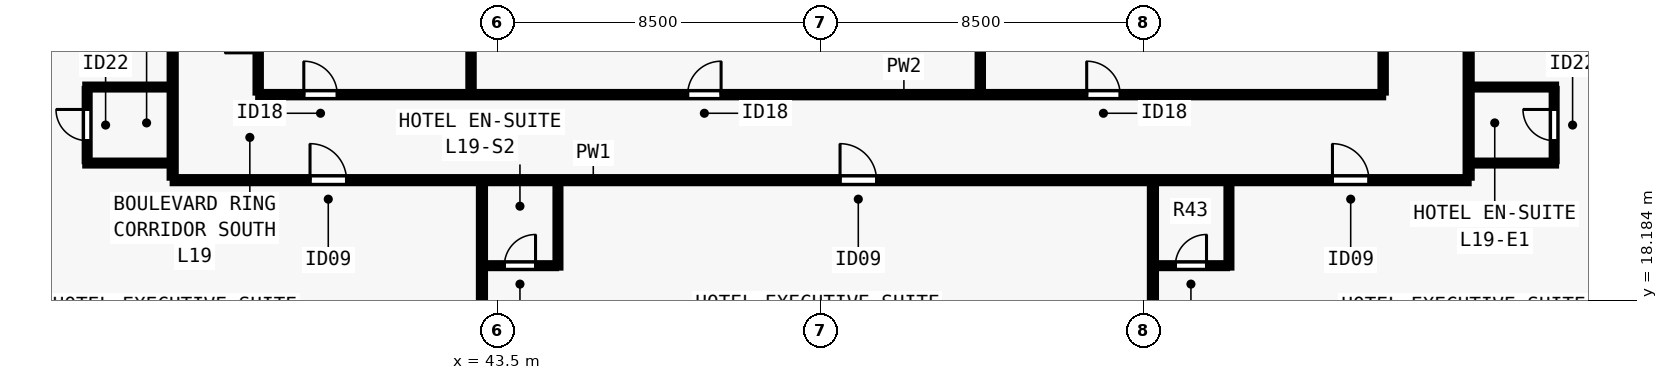
"""IFC4 building model, lengths in metres.
Left out: names, types, materials, properties, quantities, classifications, styles, units other than length and angle.
Written with IfcOpenShell. Run it as: python <this file> out.ifc"""

import sys

from ifc_helpers import new_model, si_unit, direction, frame, frame_2d, origin, place, context, subcontext, project, spatial, rectangle, extrude, element, fill, save


model = new_model("IFC4")
c1 = context("Model", 3, precision=1e-05, world=origin(), true_north=direction((0.0, 1.0)))
c2 = subcontext(c1, "Body", "Model", "MODEL_VIEW")
j1 = project(units=[si_unit("LENGTHUNIT", "METRE"), si_unit("PLANEANGLEUNIT", "RADIAN")], contexts=[c1])
p1 = place(None, origin())
s1 = spatial("IfcSite", under=j1, at=p1, CompositionType="ELEMENT")
p2 = place(p1, origin())
s2 = spatial("IfcBuilding", under=s1, at=p2, CompositionType="ELEMENT")
p3 = place(p2, frame((0.0, 0.0, 72.5)))
s3 = spatial("IfcBuildingStorey", under=s2, at=p3, CompositionType="ELEMENT", Elevation=72.5)
p4 = place(p3, frame((34.95, 21.35, 0.0), z_axis=(0.0, 0.0, 1.0), x_axis=(1.0, 0.0, 0.0)))
e1 = element("IfcWall", 1, at=p4, inside=s3, PredefinedType="PARTITIONING", context=c2, shape_type="SweptSolid", body=[
    extrude(rectangle(XDim=34.1, YDim=0.16, at=frame_2d((17.05, 0.0))), origin(), (0.0, 0.0, 1.0), 3.28),
])
p5 = place(p4, frame((3.614, 0.0, 0.0)))
e2 = element("IfcOpeningElement", 2, at=p5, cuts=e1, PredefinedType="OPENING", context=c2, shape_type="SweptSolid", body=[
    extrude(rectangle(XDim=0.96, YDim=2.15, at=frame_2d((0.48, 1.075))), frame((0.0, 0.09, 0.0), z_axis=(0.0, -1.0, 0.0), x_axis=(1.0, 0.0, 0.0)), (0.0, 0.0, 1.0), 0.18),
])
p6 = place(p4, frame((17.56, 0.0, 0.0)))
e3 = element("IfcOpeningElement", 3, at=p6, cuts=e1, PredefinedType="OPENING", context=c2, shape_type="SweptSolid", body=[
    extrude(rectangle(XDim=0.96, YDim=2.15, at=frame_2d((0.48, 1.075))), frame((0.0, 0.09, 0.0), z_axis=(0.0, -1.0, 0.0), x_axis=(1.0, 0.0, 0.0)), (0.0, 0.0, 1.0), 0.18),
])
p7 = place(p4, frame((30.516, 0.0, 0.0)))
e4 = element("IfcOpeningElement", 4, at=p7, cuts=e1, PredefinedType="OPENING", context=c2, shape_type="SweptSolid", body=[
    extrude(rectangle(XDim=0.96, YDim=2.15, at=frame_2d((0.48, 1.075))), frame((0.0, 0.09, 0.0), z_axis=(0.0, -1.0, 0.0), x_axis=(1.0, 0.0, 0.0)), (0.0, 0.0, 1.0), 0.18),
])
p8 = place(p3, frame((34.95, 21.415, 0.0), z_axis=(0.0, 0.0, 1.0), x_axis=(0.0, 1.0, 0.0)))
e5 = element("IfcWall", 5, at=p8, inside=s3, PredefinedType="PARTITIONING", context=c2, shape_type="SweptSolid", body=[
    extrude(rectangle(XDim=35.17, YDim=0.16, at=frame_2d((17.585, 0.0))), origin(), (0.0, 0.0, 1.0), 3.28),
])
p9 = place(p8, frame((9.414, 0.0, 0.0)))
e6 = element("IfcOpeningElement", 6, at=p9, cuts=e5, PredefinedType="OPENING", context=c2, shape_type="SweptSolid", body=[
    extrude(rectangle(XDim=0.96, YDim=2.15, at=frame_2d((0.48, 1.075))), frame((0.0, 0.09, 0.0), z_axis=(0.0, -1.0, 0.0), x_axis=(1.0, 0.0, 0.0)), (0.0, 0.0, 1.0), 0.18),
])
p10 = place(p8, frame((26.814, 0.0, 0.0)))
e7 = element("IfcOpeningElement", 7, at=p10, cuts=e5, PredefinedType="OPENING", context=c2, shape_type="SweptSolid", body=[
    extrude(rectangle(XDim=0.96, YDim=2.15, at=frame_2d((0.48, 1.075))), frame((0.0, 0.09, 0.0), z_axis=(0.0, -1.0, 0.0), x_axis=(1.0, 0.0, 0.0)), (0.0, 0.0, 1.0), 0.18),
])
p11 = place(p3, frame((69.05, 21.415, 0.0), z_axis=(0.0, 0.0, 1.0), x_axis=(0.0, 1.0, 0.0)))
e8 = element("IfcWall", 8, at=p11, inside=s3, PredefinedType="PARTITIONING", context=c2, shape_type="SweptSolid", body=[
    extrude(rectangle(XDim=35.17, YDim=0.16, at=frame_2d((17.585, 0.0))), origin(), (0.0, 0.0, 1.0), 3.28),
])
p12 = place(p11, frame((9.746, 0.0, 0.0)))
e9 = element("IfcOpeningElement", 9, at=p12, cuts=e8, PredefinedType="OPENING", context=c2, shape_type="SweptSolid", body=[
    extrude(rectangle(XDim=0.96, YDim=2.15, at=frame_2d((0.48, 1.075))), frame((0.0, 0.09, 0.0), z_axis=(0.0, -1.0, 0.0), x_axis=(1.0, 0.0, 0.0)), (0.0, 0.0, 1.0), 0.18),
])
p13 = place(p11, frame((27.146, 0.0, 0.0)))
e10 = element("IfcOpeningElement", 10, at=p13, cuts=e8, PredefinedType="OPENING", context=c2, shape_type="SweptSolid", body=[
    extrude(rectangle(XDim=0.96, YDim=2.15, at=frame_2d((0.48, 1.075))), frame((0.0, 0.09, 0.0), z_axis=(0.0, -1.0, 0.0), x_axis=(1.0, 0.0, 0.0)), (0.0, 0.0, 1.0), 0.18),
])
p14 = place(p3, frame((37.2, 23.6, 0.0), z_axis=(0.0, 0.0, 1.0), x_axis=(1.0, 0.0, 0.0)))
e11 = element("IfcWall", 11, at=p14, inside=s3, PredefinedType="PARTITIONING", context=c2, shape_type="SweptSolid", body=[
    extrude(rectangle(XDim=29.6, YDim=0.14, at=frame_2d((14.8, 0.0))), origin(), (0.0, 0.0, 1.0), 3.28),
])
p15 = place(p14, frame((1.2, 0.0, 0.0)))
e12 = element("IfcOpeningElement", 12, at=p15, cuts=e11, PredefinedType="OPENING", context=c2, shape_type="SweptSolid", body=[
    extrude(rectangle(XDim=0.88, YDim=2.1, at=frame_2d((0.44, 1.05))), frame((0.0, 0.08, 0.0), z_axis=(0.0, -1.0, 0.0), x_axis=(1.0, 0.0, 0.0)), (0.0, 0.0, 1.0), 0.16),
])
p16 = place(p14, frame((11.3, 0.0, 0.0)))
e13 = element("IfcOpeningElement", 13, at=p16, cuts=e11, PredefinedType="OPENING", context=c2, shape_type="SweptSolid", body=[
    extrude(rectangle(XDim=0.88, YDim=2.1, at=frame_2d((0.44, 1.05))), frame((0.0, 0.08, 0.0), z_axis=(0.0, -1.0, 0.0), x_axis=(1.0, 0.0, 0.0)), (0.0, 0.0, 1.0), 0.16),
])
p17 = place(p14, frame((21.8, 0.0, 0.0)))
e14 = element("IfcOpeningElement", 14, at=p17, cuts=e11, PredefinedType="OPENING", context=c2, shape_type="SweptSolid", body=[
    extrude(rectangle(XDim=0.88, YDim=2.1, at=frame_2d((0.44, 1.05))), frame((0.0, 0.08, 0.0), z_axis=(0.0, -1.0, 0.0), x_axis=(1.0, 0.0, 0.0)), (0.0, 0.0, 1.0), 0.16),
])
p18 = place(p3, frame((37.2, 23.655, 0.0), z_axis=(0.0, 0.0, 1.0), x_axis=(0.0, 1.0, 0.0)))
e15 = element("IfcWall", 15, at=p18, inside=s3, PredefinedType="PARTITIONING", context=c2, shape_type="SweptSolid", body=[
    extrude(rectangle(XDim=15.095, YDim=0.14, at=frame_2d((7.547, 0.0))), origin(), (0.0, 0.0, 1.0), 3.28),
])
p19 = place(p18, frame((1.045, 0.0, 0.0)))
e16 = element("IfcOpeningElement", 16, at=p19, cuts=e15, PredefinedType="OPENING", context=c2, shape_type="SweptSolid", body=[
    extrude(rectangle(XDim=0.88, YDim=2.1, at=frame_2d((0.44, 1.05))), frame((0.0, 0.08, 0.0), z_axis=(0.0, -1.0, 0.0), x_axis=(1.0, 0.0, 0.0)), (0.0, 0.0, 1.0), 0.16),
])
p20 = place(p18, frame((12.145, 0.0, 0.0)))
e17 = element("IfcOpeningElement", 17, at=p20, cuts=e15, PredefinedType="OPENING", context=c2, shape_type="SweptSolid", body=[
    extrude(rectangle(XDim=0.88, YDim=2.1, at=frame_2d((0.44, 1.05))), frame((0.0, 0.08, 0.0), z_axis=(0.0, -1.0, 0.0), x_axis=(1.0, 0.0, 0.0)), (0.0, 0.0, 1.0), 0.16),
])
p21 = place(p3, frame((66.8, 23.655, 0.0), z_axis=(0.0, 0.0, 1.0), x_axis=(0.0, 1.0, 0.0)))
e18 = element("IfcWall", 18, at=p21, inside=s3, PredefinedType="PARTITIONING", context=c2, shape_type="SweptSolid", body=[
    extrude(rectangle(XDim=15.095, YDim=0.14, at=frame_2d((7.547, 0.0))), origin(), (0.0, 0.0, 1.0), 3.28),
])
p22 = place(p21, frame((2.445, 0.0, 0.0)))
e19 = element("IfcOpeningElement", 19, at=p22, cuts=e18, PredefinedType="OPENING", context=c2, shape_type="SweptSolid", body=[
    extrude(rectangle(XDim=0.88, YDim=2.1, at=frame_2d((0.44, 1.05))), frame((0.0, 0.08, 0.0), z_axis=(0.0, -1.0, 0.0), x_axis=(1.0, 0.0, 0.0)), (0.0, 0.0, 1.0), 0.16),
])
p23 = place(p3, frame((42.8, 23.655, 0.0), z_axis=(0.0, 0.0, 1.0), x_axis=(0.0, 1.0, 0.0)))
e20 = element("IfcWall", 20, at=p23, inside=s3, PredefinedType="PARTITIONING", context=c2, shape_type="SweptSolid", body=[
    extrude(rectangle(XDim=6.845, YDim=0.14, at=frame_2d((3.422, 0.0))), origin(), (0.0, 0.0, 1.0), 2.439),
])
p24 = place(p3, frame((56.2, 23.655, 0.0), z_axis=(0.0, 0.0, 1.0), x_axis=(0.0, 1.0, 0.0)))
e21 = element("IfcWall", 21, at=p24, inside=s3, PredefinedType="PARTITIONING", context=c2, shape_type="SweptSolid", body=[
    extrude(rectangle(XDim=6.585, YDim=0.14, at=frame_2d((3.292, 0.0))), origin(), (0.0, 0.0, 1.0), 2.849),
])
p25 = place(p3, frame((43.087, 13.845, 0.0), z_axis=(0.0, 0.0, 1.0), x_axis=(0.0, 1.0, 0.0)))
e22 = element("IfcWall", 22, at=p25, inside=s3, PredefinedType="PARTITIONING", context=c2, shape_type="SweptSolid", body=[
    extrude(rectangle(XDim=7.44, YDim=0.16, at=frame_2d((3.72, 0.0))), origin(), (0.0, 0.0, 1.0), 3.28),
])
p26 = place(p3, frame((45.087, 19.05, 0.0), z_axis=(0.0, 0.0, 1.0), x_axis=(0.0, 1.0, 0.0)))
e23 = element("IfcWall", 23, at=p26, inside=s3, PredefinedType="PLUMBINGWALL", context=c2, shape_type="SweptSolid", body=[
    extrude(rectangle(XDim=2.235, YDim=0.13, at=frame_2d((1.117, 0.0))), origin(), (0.0, 0.0, 1.0), 3.28),
])
p27 = place(p3, frame((43.153, 19.1, 0.0), z_axis=(0.0, 0.0, 1.0), x_axis=(1.0, 0.0, 0.0)))
e24 = element("IfcWall", 24, at=p27, inside=s3, PredefinedType="PLUMBINGWALL", context=c2, shape_type="SweptSolid", body=[
    extrude(rectangle(XDim=1.885, YDim=0.13, at=frame_2d((0.942, 0.0))), origin(), (0.0, 0.0, 1.0), 3.28),
])
p28 = place(p27, frame((0.525, 0.0, 0.0)))
e25 = element("IfcOpeningElement", 25, at=p28, cuts=e24, PredefinedType="OPENING", context=c2, shape_type="SweptSolid", body=[
    extrude(rectangle(XDim=0.82, YDim=2.1, at=frame_2d((0.41, 1.05))), frame((0.0, 0.075, 0.0), z_axis=(0.0, -1.0, 0.0), x_axis=(1.0, 0.0, 0.0)), (0.0, 0.0, 1.0), 0.15),
])
p29 = place(p3, frame((60.742, 13.845, 0.0), z_axis=(0.0, 0.0, 1.0), x_axis=(0.0, 1.0, 0.0)))
e26 = element("IfcWall", 26, at=p29, inside=s3, PredefinedType="PARTITIONING", context=c2, shape_type="SweptSolid", body=[
    extrude(rectangle(XDim=7.44, YDim=0.16, at=frame_2d((3.72, 0.0))), origin(), (0.0, 0.0, 1.0), 3.28),
])
p30 = place(p3, frame((62.742, 19.05, 0.0), z_axis=(0.0, 0.0, 1.0), x_axis=(0.0, 1.0, 0.0)))
e27 = element("IfcWall", 27, at=p30, inside=s3, PredefinedType="PLUMBINGWALL", context=c2, shape_type="SweptSolid", body=[
    extrude(rectangle(XDim=2.235, YDim=0.13, at=frame_2d((1.117, 0.0))), origin(), (0.0, 0.0, 1.0), 3.28),
])
p31 = place(p3, frame((60.808, 19.1, 0.0), z_axis=(0.0, 0.0, 1.0), x_axis=(1.0, 0.0, 0.0)))
e28 = element("IfcWall", 28, at=p31, inside=s3, PredefinedType="PLUMBINGWALL", context=c2, shape_type="SweptSolid", body=[
    extrude(rectangle(XDim=1.885, YDim=0.13, at=frame_2d((0.942, 0.0))), origin(), (0.0, 0.0, 1.0), 3.28),
])
p32 = place(p31, frame((0.525, 0.0, 0.0)))
e29 = element("IfcOpeningElement", 29, at=p32, cuts=e28, PredefinedType="OPENING", context=c2, shape_type="SweptSolid", body=[
    extrude(rectangle(XDim=0.82, YDim=2.1, at=frame_2d((0.41, 1.05))), frame((0.0, 0.075, 0.0), z_axis=(0.0, -1.0, 0.0), x_axis=(1.0, 0.0, 0.0)), (0.0, 0.0, 1.0), 0.15),
])
p33 = place(p3, frame((32.65, 21.8, 0.0), z_axis=(0.0, 0.0, 1.0), x_axis=(1.0, 0.0, 0.0)))
e30 = element("IfcWall", 30, at=p33, inside=s3, PredefinedType="PLUMBINGWALL", context=c2, shape_type="SweptSolid", body=[
    extrude(rectangle(XDim=2.235, YDim=0.13, at=frame_2d((1.118, 0.0))), origin(), (0.0, 0.0, 1.0), 2.849),
])
p34 = place(p3, frame((32.65, 23.8, 0.0), z_axis=(0.0, 0.0, 1.0), x_axis=(1.0, 0.0, 0.0)))
e31 = element("IfcWall", 31, at=p34, inside=s3, PredefinedType="PLUMBINGWALL", context=c2, shape_type="SweptSolid", body=[
    extrude(rectangle(XDim=2.235, YDim=0.13, at=frame_2d((1.118, 0.0))), origin(), (0.0, 0.0, 1.0), 3.28),
])
p35 = place(p3, frame((32.7, 21.85, 0.0), z_axis=(0.0, 0.0, 1.0), x_axis=(0.0, 1.0, 0.0)))
e32 = element("IfcWall", 32, at=p35, inside=s3, PredefinedType="PLUMBINGWALL", context=c2, shape_type="SweptSolid", body=[
    extrude(rectangle(XDim=1.9, YDim=0.13, at=frame_2d((0.95, 0.0))), origin(), (0.0, 0.0, 1.0), 3.28),
])
p36 = place(p35, frame((0.54, 0.0, 0.0)))
e33 = element("IfcOpeningElement", 33, at=p36, cuts=e32, PredefinedType="OPENING", context=c2, shape_type="SweptSolid", body=[
    extrude(rectangle(XDim=0.82, YDim=2.1, at=frame_2d((0.41, 1.05))), frame((0.0, 0.075, 0.0), z_axis=(0.0, -1.0, 0.0), x_axis=(1.0, 0.0, 0.0)), (0.0, 0.0, 1.0), 0.15),
])
p37 = place(p3, frame((69.115, 21.8, 0.0), z_axis=(0.0, 0.0, 1.0), x_axis=(1.0, 0.0, 0.0)))
e34 = element("IfcWall", 34, at=p37, inside=s3, PredefinedType="PLUMBINGWALL", context=c2, shape_type="SweptSolid", body=[
    extrude(rectangle(XDim=2.235, YDim=0.13, at=frame_2d((1.118, 0.0))), origin(), (0.0, 0.0, 1.0), 2.849),
])
p38 = place(p3, frame((69.115, 23.8, 0.0), z_axis=(0.0, 0.0, 1.0), x_axis=(1.0, 0.0, 0.0)))
e35 = element("IfcWall", 35, at=p38, inside=s3, PredefinedType="PLUMBINGWALL", context=c2, shape_type="SweptSolid", body=[
    extrude(rectangle(XDim=2.235, YDim=0.13, at=frame_2d((1.118, 0.0))), origin(), (0.0, 0.0, 1.0), 3.28),
])
p39 = place(p3, frame((71.3, 21.85, 0.0), z_axis=(0.0, 0.0, 1.0), x_axis=(0.0, 1.0, 0.0)))
e36 = element("IfcWall", 36, at=p39, inside=s3, PredefinedType="PLUMBINGWALL", context=c2, shape_type="SweptSolid", body=[
    extrude(rectangle(XDim=1.9, YDim=0.13, at=frame_2d((0.95, 0.0))), origin(), (0.0, 0.0, 1.0), 3.28),
])
p40 = place(p39, frame((0.54, 0.0, 0.0)))
e37 = element("IfcOpeningElement", 37, at=p40, cuts=e36, PredefinedType="OPENING", context=c2, shape_type="SweptSolid", body=[
    extrude(rectangle(XDim=0.82, YDim=2.1, at=frame_2d((0.41, 1.05))), frame((0.0, 0.075, 0.0), z_axis=(0.0, -1.0, 0.0), x_axis=(1.0, 0.0, 0.0)), (0.0, 0.0, 1.0), 0.15),
])
p41 = place(p15, origin())
e38 = element("IfcDoor", 38, at=p41, inside=s3, OperationType="SINGLE_SWING_LEFT", PredefinedType="DOOR", context=c2, shape_type="SweptSolid", body=[
    extrude(rectangle(XDim=0.88, YDim=2.1, at=frame_2d((0.44, 1.05))), frame((0.0, 0.025, 0.0), z_axis=(0.0, -1.0, 0.0), x_axis=(1.0, 0.0, 0.0)), (0.0, 0.0, 1.0), 0.05),
])
fill(e12, e38)
p42 = place(p16, origin())
e39 = element("IfcDoor", 39, at=p42, inside=s3, OperationType="SINGLE_SWING_RIGHT", PredefinedType="DOOR", context=c2, shape_type="SweptSolid", body=[
    extrude(rectangle(XDim=0.88, YDim=2.1, at=frame_2d((0.44, 1.05))), frame((0.0, 0.025, 0.0), z_axis=(0.0, -1.0, 0.0), x_axis=(1.0, 0.0, 0.0)), (0.0, 0.0, 1.0), 0.05),
])
fill(e13, e39)
p43 = place(p17, origin())
e40 = element("IfcDoor", 40, at=p43, inside=s3, OperationType="SINGLE_SWING_LEFT", PredefinedType="DOOR", context=c2, shape_type="SweptSolid", body=[
    extrude(rectangle(XDim=0.88, YDim=2.1, at=frame_2d((0.44, 1.05))), frame((0.0, 0.025, 0.0), z_axis=(0.0, -1.0, 0.0), x_axis=(1.0, 0.0, 0.0)), (0.0, 0.0, 1.0), 0.05),
])
fill(e14, e40)
p44 = place(p19, origin())
e41 = element("IfcDoor", 41, at=p44, inside=s3, OperationType="SINGLE_SWING_LEFT", PredefinedType="DOOR", context=c2, shape_type="SweptSolid", body=[
    extrude(rectangle(XDim=0.88, YDim=2.1, at=frame_2d((0.44, 1.05))), frame((0.0, 0.025, 0.0), z_axis=(0.0, -1.0, 0.0), x_axis=(1.0, 0.0, 0.0)), (0.0, 0.0, 1.0), 0.05),
])
fill(e16, e41)
p45 = place(p5, origin())
e42 = element("IfcDoor", 42, at=p45, inside=s3, OperationType="SINGLE_SWING_LEFT", PredefinedType="DOOR", context=c2, shape_type="SweptSolid", body=[
    extrude(rectangle(XDim=0.96, YDim=2.15, at=frame_2d((0.48, 1.075))), frame((0.0, 0.025, 0.0), z_axis=(0.0, -1.0, 0.0), x_axis=(1.0, 0.0, 0.0)), (0.0, 0.0, 1.0), 0.05),
])
fill(e2, e42)
p46 = place(p28, origin())
e43 = element("IfcDoor", 43, at=p46, inside=s3, OperationType="SINGLE_SWING_RIGHT", PredefinedType="DOOR", context=c2, shape_type="SweptSolid", body=[
    extrude(rectangle(XDim=0.82, YDim=2.1, at=frame_2d((0.41, 1.05))), frame((0.0, 0.025, 0.0), z_axis=(0.0, -1.0, 0.0), x_axis=(1.0, 0.0, 0.0)), (0.0, 0.0, 1.0), 0.05),
])
fill(e25, e43)
p47 = place(p6, origin())
e44 = element("IfcDoor", 44, at=p47, inside=s3, OperationType="SINGLE_SWING_LEFT", PredefinedType="DOOR", context=c2, shape_type="SweptSolid", body=[
    extrude(rectangle(XDim=0.96, YDim=2.15, at=frame_2d((0.48, 1.075))), frame((0.0, 0.025, 0.0), z_axis=(0.0, -1.0, 0.0), x_axis=(1.0, 0.0, 0.0)), (0.0, 0.0, 1.0), 0.05),
])
fill(e3, e44)
p48 = place(p32, origin())
e45 = element("IfcDoor", 45, at=p48, inside=s3, OperationType="SINGLE_SWING_RIGHT", PredefinedType="DOOR", context=c2, shape_type="SweptSolid", body=[
    extrude(rectangle(XDim=0.82, YDim=2.1, at=frame_2d((0.41, 1.05))), frame((0.0, 0.025, 0.0), z_axis=(0.0, -1.0, 0.0), x_axis=(1.0, 0.0, 0.0)), (0.0, 0.0, 1.0), 0.05),
])
fill(e29, e45)
p49 = place(p7, origin())
e46 = element("IfcDoor", 46, at=p49, inside=s3, OperationType="SINGLE_SWING_LEFT", PredefinedType="DOOR", context=c2, shape_type="SweptSolid", body=[
    extrude(rectangle(XDim=0.96, YDim=2.15, at=frame_2d((0.48, 1.075))), frame((0.0, 0.025, 0.0), z_axis=(0.0, -1.0, 0.0), x_axis=(1.0, 0.0, 0.0)), (0.0, 0.0, 1.0), 0.05),
])
fill(e4, e46)
p50 = place(p36, origin())
e47 = element("IfcDoor", 47, at=p50, inside=s3, OperationType="SINGLE_SWING_RIGHT", PredefinedType="DOOR", context=c2, shape_type="SweptSolid", body=[
    extrude(rectangle(XDim=0.82, YDim=2.1, at=frame_2d((0.41, 1.05))), frame((0.0, 0.025, 0.0), z_axis=(0.0, -1.0, 0.0), x_axis=(1.0, 0.0, 0.0)), (0.0, 0.0, 1.0), 0.05),
])
fill(e33, e47)
p51 = place(p40, origin())
e48 = element("IfcDoor", 48, at=p51, inside=s3, OperationType="SINGLE_SWING_RIGHT", PredefinedType="DOOR", context=c2, shape_type="SweptSolid", body=[
    extrude(rectangle(XDim=0.82, YDim=2.1, at=frame_2d((0.41, 1.05))), frame((0.0, 0.025, 0.0), z_axis=(0.0, -1.0, 0.0), x_axis=(1.0, 0.0, 0.0)), (0.0, 0.0, 1.0), 0.05),
])
fill(e37, e48)
save(model, sys.argv[1])
